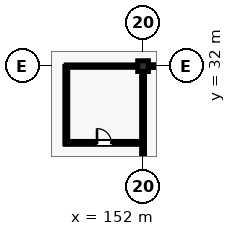
"""IFC4 building model, lengths in metres.
Left out: names, types, materials, properties, quantities, classifications, styles, units other than length and angle.
Written with IfcOpenShell. Run it as: python <this file> out.ifc"""

import sys

from ifc_helpers import new_model, si_unit, direction, frame, frame_2d, origin, origin_2d, place, context, subcontext, project, spatial, rectangle, extrude, element, fill, save


model = new_model("IFC4")
c1 = context("Model", 3, precision=1e-05, world=origin(), true_north=direction((0.0, 1.0)))
c2 = subcontext(c1, "Body", "Model", "MODEL_VIEW")
j1 = project(units=[si_unit("LENGTHUNIT", "METRE"), si_unit("PLANEANGLEUNIT", "RADIAN")], contexts=[c1])
p1 = place(None, origin())
s1 = spatial("IfcSite", under=j1, at=p1, CompositionType="ELEMENT")
p2 = place(p1, origin())
s2 = spatial("IfcBuilding", under=s1, at=p2, CompositionType="ELEMENT")
p3 = place(p2, origin())
s3 = spatial("IfcBuildingStorey", under=s2, at=p3, CompositionType="ELEMENT", Elevation=0.0)
p4 = place(p3, frame((152.0, 32.0, 0.0), z_axis=(0.0, 0.0, 1.0), x_axis=(1.0, 0.0, 0.0)))
e1 = element("IfcColumn", 1, at=p4, inside=s3, PredefinedType="COLUMN", context=c2, shape_type="SweptSolid", body=[
    extrude(rectangle(XDim=0.7, YDim=0.7, at=origin_2d()), origin(), (0.0, 0.0, 1.0), 5.28),
])
p5 = place(p3, frame((146.9, 26.95, 0.0), z_axis=(0.0, 0.0, 1.0), x_axis=(1.0, 0.0, 0.0)))
e2 = element("IfcWall", 2, at=p5, inside=s3, PredefinedType="PARTITIONING", context=c2, shape_type="SweptSolid", body=[
    extrude(rectangle(XDim=5.08, YDim=0.185, at=frame_2d((2.54, 0.0))), origin(), (0.0, 0.0, 1.0), 5.025),
])
p6 = place(p5, frame((2.07, 0.0, 0.0)))
e3 = element("IfcOpeningElement", 3, at=p6, cuts=e2, PredefinedType="OPENING", context=c2, shape_type="SweptSolid", body=[
    extrude(rectangle(XDim=0.94, YDim=2.12, at=frame_2d((0.47, 1.06))), frame((0.0, 0.103, 0.0), z_axis=(0.0, -1.0, 0.0), x_axis=(1.0, 0.0, 0.0)), (0.0, 0.0, 1.0), 0.205),
])
p7 = place(p3, frame((146.95, 26.9, 0.0), z_axis=(0.0, 0.0, 1.0), x_axis=(0.0, 1.0, 0.0)))
e4 = element("IfcWall", 4, at=p7, inside=s3, PredefinedType="PARTITIONING", context=c2, shape_type="SweptSolid", body=[
    extrude(rectangle(XDim=5.08, YDim=0.185, at=frame_2d((2.54, 0.0))), origin(), (0.0, 0.0, 1.0), 4.607),
])
p8 = place(p3, frame((146.95, 32.0, 0.0), z_axis=(0.0, 0.0, 1.0), x_axis=(1.0, 0.0, 0.0)))
e5 = element("IfcWall", 5, at=p8, inside=s3, PredefinedType="PARTITIONING", context=c2, shape_type="SweptSolid", body=[
    extrude(rectangle(XDim=4.69, YDim=0.15, at=frame_2d((2.345, 0.0))), origin(), (0.0, 0.0, 1.0), 4.607),
])
p9 = place(p3, frame((152.0, 24.34, 0.0), z_axis=(0.0, 0.0, 1.0), x_axis=(0.0, 1.0, 0.0)))
e6 = element("IfcWall", 6, at=p9, inside=s3, PredefinedType="PARTITIONING", context=c2, shape_type="SweptSolid", body=[
    extrude(rectangle(XDim=7.32, YDim=0.185, at=frame_2d((3.66, 0.0))), origin(), (0.0, 0.0, 1.0), 5.025),
])
p10 = place(p9, frame((0.52, 0.0, 0.0)))
e7 = element("IfcOpeningElement", 7, at=p10, cuts=e6, PredefinedType="OPENING", context=c2, shape_type="SweptSolid", body=[
    extrude(rectangle(XDim=0.94, YDim=2.12, at=frame_2d((0.47, 1.06))), frame((0.0, 0.103, 0.0), z_axis=(0.0, -1.0, 0.0), x_axis=(1.0, 0.0, 0.0)), (0.0, 0.0, 1.0), 0.205),
])
p11 = place(p3, frame((152.34, 32.0, 0.0), z_axis=(0.0, 0.0, 1.0), x_axis=(1.0, 0.0, 0.0)))
e8 = element("IfcWall", 8, at=p11, inside=s3, PredefinedType="PARTITIONING", context=c2, shape_type="SweptSolid", body=[
    extrude(rectangle(XDim=7.32, YDim=0.175, at=frame_2d((3.66, 0.0))), origin(), (0.0, 0.0, 1.0), 4.67),
])
p12 = place(p11, frame((2.71, 0.0, 0.0)))
e9 = element("IfcOpeningElement", 9, at=p12, cuts=e8, PredefinedType="OPENING", context=c2, shape_type="SweptSolid", body=[
    extrude(rectangle(XDim=1.9, YDim=2.38, at=frame_2d((0.95, 1.19))), frame((0.0, 0.097, 0.0), z_axis=(0.0, -1.0, 0.0), x_axis=(1.0, 0.0, 0.0)), (0.0, 0.0, 1.0), 0.195),
])
p13 = place(p6, origin())
e10 = element("IfcDoor", 10, at=p13, inside=s3, OperationType="SINGLE_SWING_LEFT", PredefinedType="DOOR", context=c2, shape_type="SweptSolid", body=[
    extrude(rectangle(XDim=0.94, YDim=2.12, at=frame_2d((0.47, 1.06))), frame((0.0, 0.025, 0.0), z_axis=(0.0, -1.0, 0.0), x_axis=(1.0, 0.0, 0.0)), (0.0, 0.0, 1.0), 0.05),
])
fill(e3, e10)
save(model, sys.argv[1])
